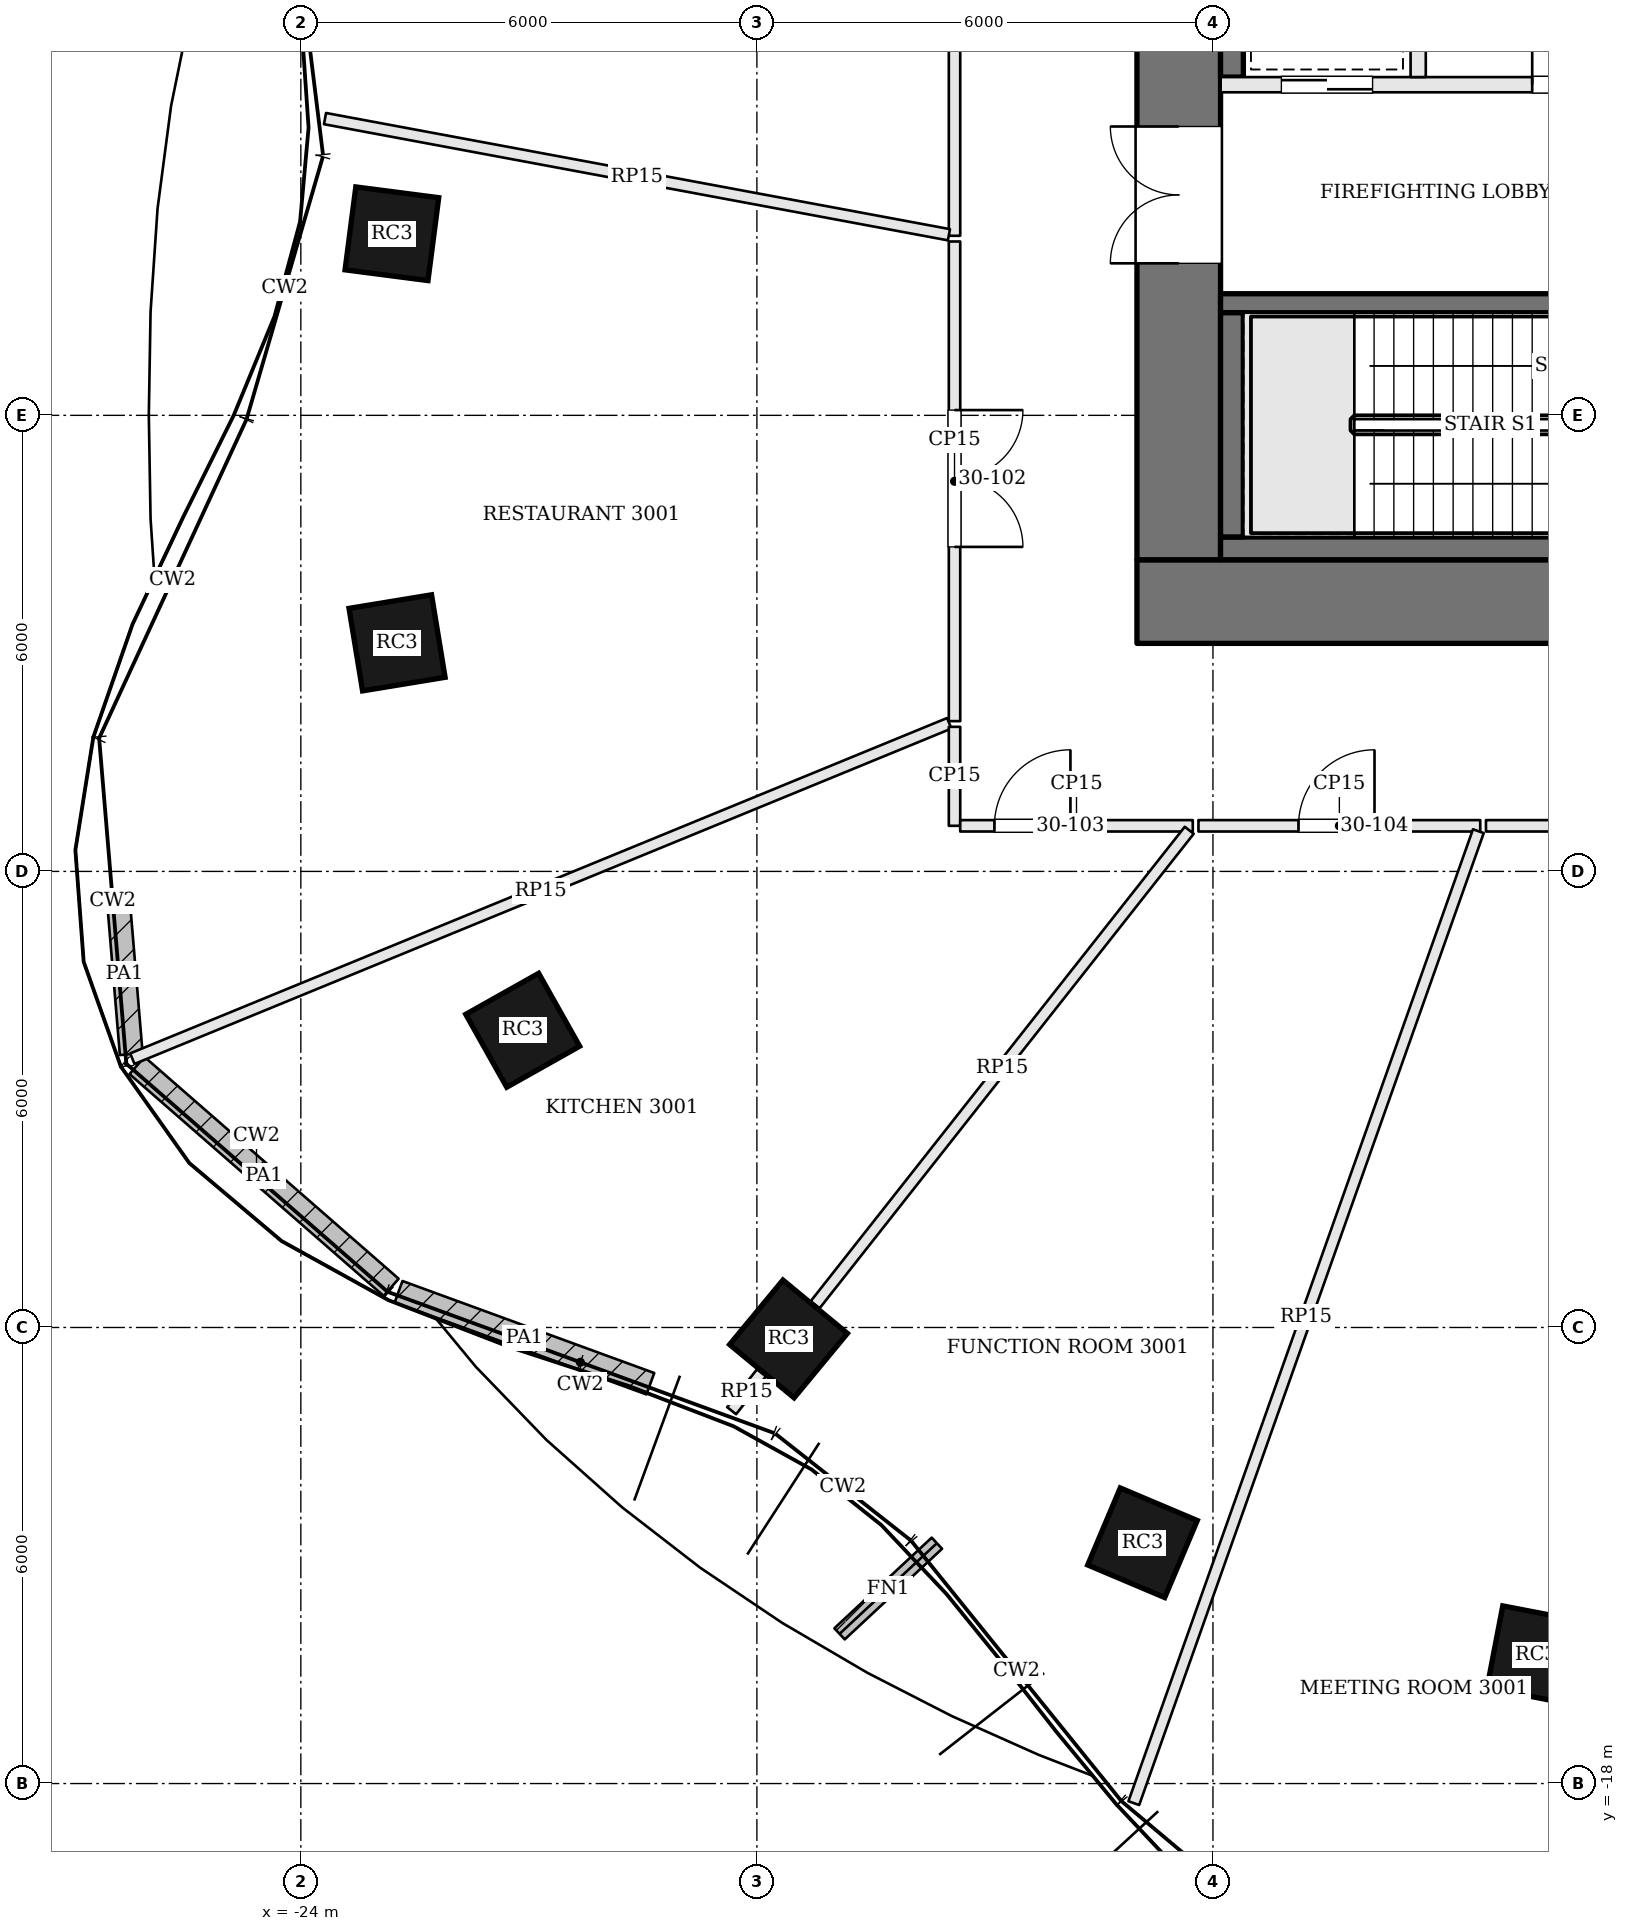
"""IFC4 building model, lengths in metres.
Left out: names, types, materials, properties, quantities, classifications, styles, units other than length and angle.
Written with IfcOpenShell. Run it as: python <this file> out.ifc"""

import sys

from ifc_helpers import new_model, si_unit, direction, frame, frame_2d, origin, origin_2d, place, context, subcontext, project, spatial, rectangle, extrude, element, fill, save


model = new_model("IFC4")
c1 = context("Model", 3, precision=1e-05, world=origin(), true_north=direction((0.0, 1.0)))
c2 = subcontext(c1, "Body", "Model", "MODEL_VIEW")
j1 = project(units=[si_unit("LENGTHUNIT", "METRE"), si_unit("PLANEANGLEUNIT", "RADIAN")], contexts=[c1])
p1 = place(None, origin())
s1 = spatial("IfcSite", under=j1, at=p1, CompositionType="ELEMENT")
p2 = place(p1, origin())
s2 = spatial("IfcBuilding", under=s1, at=p2, CompositionType="ELEMENT")
p3 = place(p2, frame((0.0, 0.0, 125.7)))
s3 = spatial("IfcBuildingStorey", under=s2, at=p3, CompositionType="ELEMENT", Elevation=125.7)
p4 = place(p3, frame((-13.0, -2.45, 0.0), z_axis=(0.0, 0.0, 1.0), x_axis=(1.0, 0.0, 0.0)))
e1 = element("IfcWall", 1, at=p4, inside=s3, PredefinedType="SHEAR", context=c2, shape_type="SweptSolid", body=[
    extrude(rectangle(XDim=26.0, YDim=1.1, at=frame_2d((13.0, 0.0))), origin(), (0.0, 0.0, 1.0), 4.8),
])
p5 = place(p4, frame((9.275, 0.0, 0.0)))
e2 = element("IfcOpeningElement", 2, at=p5, cuts=e1, PredefinedType="OPENING", context=c2, shape_type="SweptSolid", body=[
    extrude(rectangle(XDim=0.9, YDim=2.1, at=frame_2d((0.45, 1.05))), frame((0.0, 0.56, 0.0), z_axis=(0.0, -1.0, 0.0), x_axis=(1.0, 0.0, 0.0)), (0.0, 0.0, 1.0), 1.12),
])
p6 = place(p4, frame((12.525, 0.0, 0.0)))
e3 = element("IfcOpeningElement", 3, at=p6, cuts=e1, PredefinedType="OPENING", context=c2, shape_type="SweptSolid", body=[
    extrude(rectangle(XDim=0.9, YDim=2.1, at=frame_2d((0.45, 1.05))), frame((0.0, 0.56, 0.0), z_axis=(0.0, -1.0, 0.0), x_axis=(1.0, 0.0, 0.0)), (0.0, 0.0, 1.0), 1.12),
])
p7 = place(p4, frame((15.0, 0.0, 0.0)))
e4 = element("IfcOpeningElement", 4, at=p7, cuts=e1, PredefinedType="OPENING", context=c2, shape_type="SweptSolid", body=[
    extrude(rectangle(XDim=1.0, YDim=2.1, at=frame_2d((0.5, 1.05))), frame((0.0, 0.56, 0.0), z_axis=(0.0, -1.0, 0.0), x_axis=(1.0, 0.0, 0.0)), (0.0, 0.0, 1.0), 1.12),
])
p8 = place(p4, frame((16.7, 0.0, 0.0)))
e5 = element("IfcOpeningElement", 5, at=p8, cuts=e1, PredefinedType="OPENING", context=c2, shape_type="SweptSolid", body=[
    extrude(rectangle(XDim=0.9, YDim=2.1, at=frame_2d((0.45, 1.05))), frame((0.0, 0.56, 0.0), z_axis=(0.0, -1.0, 0.0), x_axis=(1.0, 0.0, 0.0)), (0.0, 0.0, 1.0), 1.12),
])
p9 = place(p3, frame((-12.45, -1.9, 0.0), z_axis=(0.0, 0.0, 1.0), x_axis=(0.0, 1.0, 0.0)))
e6 = element("IfcWall", 6, at=p9, inside=s3, PredefinedType="SHEAR", context=c2, shape_type="SweptSolid", body=[
    extrude(rectangle(XDim=12.8, YDim=1.1, at=frame_2d((6.4, 0.0))), origin(), (0.0, 0.0, 1.0), 4.8),
])
p10 = place(p9, frame((3.9, 0.0, 0.0)))
e7 = element("IfcOpeningElement", 7, at=p10, cuts=e6, PredefinedType="OPENING", context=c2, shape_type="SweptSolid", body=[
    extrude(rectangle(XDim=1.8, YDim=2.1, at=frame_2d((0.9, 1.05))), frame((0.0, 0.56, 0.0), z_axis=(0.0, -1.0, 0.0), x_axis=(1.0, 0.0, 0.0)), (0.0, 0.0, 1.0), 1.12),
])
for number, where, z_axis, x_axis in (
    (8, (-22.802, 2.389, -0.7), (0.0, 0.0, 1.0), (-0.129, -0.992, 0.0)),
    (9, (-22.734, -2.993, -0.7), (0.0, 0.0, 1.0), (0.162, -0.987, 0.0)),
    (10, (-21.081, -8.09, -0.7), (0.0, 0.0, 1.0), (0.49, -0.872, 0.0)),
    (11, (-17.584, -12.151, -0.7), (0.0, 0.0, 1.0), (0.771, -0.637, 0.0)),
    (12, (-12.927, -14.832, -0.7), (0.0, 0.0, 1.0), (0.921, -0.389, 0.0)),
    (13, (-7.751, -16.307, -0.7), (0.0, 0.0, 1.0), (0.982, -0.189, 0.0)),
):
    element("IfcColumn", number, at=place(p3, frame(where, z_axis=z_axis, x_axis=x_axis)), inside=s3, PredefinedType="COLUMN", context=c2, shape_type="SweptSolid", body=[
        extrude(rectangle(XDim=1.1, YDim=1.1, at=origin_2d()), origin(), (0.0, 0.0, 1.0), 5.5),
    ])
p11 = place(p3, frame((-15.632, -14.838, 0.0), z_axis=(0.0, 0.0, 1.0), x_axis=(-0.73177399504, -0.681547371929, 0.0)))
e14 = element("IfcWall", 14, at=p11, inside=s3, PredefinedType="SOLIDWALL", context=c2, shape_type="SweptSolid", body=[
    extrude(rectangle(XDim=1.75, YDim=0.2, at=frame_2d((0.875, 0.0))), origin(), (0.0, 0.0, 1.0), 4.6),
])
p12 = place(p3, frame((-26.407, -6.296, 4.8), z_axis=(0.0, 0.0, 1.0), x_axis=(0.083236561351, -0.99652981634, 0.0)))
e15 = element("IfcWall", 15, at=p12, inside=s3, PredefinedType="PARAPET", context=c2, shape_type="SweptSolid", body=[
    extrude(rectangle(XDim=2.115, YDim=0.3, at=frame_2d((1.057, 0.0))), origin(), (0.0, 0.0, 1.0), 1.1),
])
p13 = place(p3, frame((-26.155, -8.554, 4.8), z_axis=(0.0, 0.0, 1.0), x_axis=(0.753400870431, -0.657561501636, 0.0)))
e16 = element("IfcWall", 16, at=p13, inside=s3, PredefinedType="PARAPET", context=c2, shape_type="SweptSolid", body=[
    extrude(rectangle(XDim=4.438, YDim=0.3, at=frame_2d((2.219, 0.0))), origin(), (0.0, 0.0, 1.0), 1.1),
])
p14 = place(p3, frame((-22.714, -11.53, 4.8), z_axis=(0.0, 0.0, 1.0), x_axis=(0.93926063174, -0.343204699361, 0.0)))
e17 = element("IfcWall", 17, at=p14, inside=s3, PredefinedType="PARAPET", context=c2, shape_type="SweptSolid", body=[
    extrude(rectangle(XDim=3.526, YDim=0.3, at=frame_2d((1.763, 0.0))), origin(), (0.0, 0.0, 1.0), 1.1),
])
p15 = place(p3, frame((-11.9, 1.475, 0.0), z_axis=(0.0, 0.0, 1.0), x_axis=(1.0, 0.0, 0.0)))
e18 = element("IfcWall", 18, at=p15, inside=s3, PredefinedType="SOLIDWALL", context=c2, shape_type="SweptSolid", body=[
    extrude(rectangle(XDim=6.8, YDim=0.25, at=frame_2d((3.4, 0.0))), origin(), (0.0, 0.0, 1.0), 4.6),
])
p16 = place(p15, frame((5.5, 0.0, 0.0)))
e19 = element("IfcOpeningElement", 19, at=p16, cuts=e18, PredefinedType="OPENING", context=c2, shape_type="SweptSolid", body=[
    extrude(rectangle(XDim=1.2, YDim=2.1, at=frame_2d((0.6, 1.05))), frame((0.0, 0.135, 0.0), z_axis=(0.0, -1.0, 0.0), x_axis=(1.0, 0.0, 0.0)), (0.0, 0.0, 1.0), 0.27),
])
p17 = place(p3, frame((-11.9, 4.35, 0.0), z_axis=(0.0, 0.0, 1.0), x_axis=(1.0, 0.0, 0.0)))
e20 = element("IfcWall", 20, at=p17, inside=s3, PredefinedType="SOLIDWALL", context=c2, shape_type="SweptSolid", body=[
    extrude(rectangle(XDim=6.8, YDim=0.2, at=frame_2d((3.4, 0.0))), origin(), (0.0, 0.0, 1.0), 4.6),
])
p18 = place(p17, frame((4.1, 0.0, 0.0)))
e21 = element("IfcOpeningElement", 21, at=p18, cuts=e20, PredefinedType="OPENING", context=c2, shape_type="SweptSolid", body=[
    extrude(rectangle(XDim=1.2, YDim=2.1, at=frame_2d((0.6, 1.05))), frame((0.0, 0.11, 0.0), z_axis=(0.0, -1.0, 0.0), x_axis=(1.0, 0.0, 0.0)), (0.0, 0.0, 1.0), 0.22),
])
p19 = place(p17, frame((0.8, 0.0, 0.0)))
e22 = element("IfcOpeningElement", 22, at=p19, cuts=e20, PredefinedType="OPENING", context=c2, shape_type="SweptSolid", body=[
    extrude(rectangle(XDim=1.2, YDim=2.1, at=frame_2d((0.6, 1.05))), frame((0.0, 0.11, 0.0), z_axis=(0.0, -1.0, 0.0), x_axis=(1.0, 0.0, 0.0)), (0.0, 0.0, 1.0), 0.22),
])
p20 = place(p3, frame((-9.3, 4.45, 0.0), z_axis=(0.0, 0.0, 1.0), x_axis=(0.0, 1.0, 0.0)))
e23 = element("IfcWall", 23, at=p20, inside=s3, PredefinedType="SOLIDWALL", context=c2, shape_type="SweptSolid", body=[
    extrude(rectangle(XDim=3.0, YDim=0.2, at=frame_2d((1.5, 0.0))), origin(), (0.0, 0.0, 1.0), 4.6),
])
p21 = place(p3, frame((-11.9, -1.75, 0.0), z_axis=(0.0, 0.0, 1.0), x_axis=(1.0, 0.0, 0.0)))
e24 = element("IfcWall", 24, at=p21, inside=s3, PredefinedType="SOLIDWALL", context=c2, shape_type="SweptSolid", body=[
    extrude(rectangle(XDim=6.8, YDim=0.3, at=frame_2d((3.4, 0.0))), origin(), (0.0, 0.0, 1.0), 4.6),
])
p22 = place(p3, frame((-11.75, -1.6, 0.0), z_axis=(0.0, 0.0, 1.0), x_axis=(0.0, 1.0, 0.0)))
e25 = element("IfcWall", 25, at=p22, inside=s3, PredefinedType="SOLIDWALL", context=c2, shape_type="SweptSolid", body=[
    extrude(rectangle(XDim=2.95, YDim=0.3, at=frame_2d((1.475, 0.0))), origin(), (0.0, 0.0, 1.0), 4.6),
])
p23 = place(p3, frame((-11.75, 4.45, 0.0), z_axis=(0.0, 0.0, 1.0), x_axis=(0.0, 1.0, 0.0)))
e26 = element("IfcWall", 26, at=p23, inside=s3, PredefinedType="SOLIDWALL", context=c2, shape_type="SweptSolid", body=[
    extrude(rectangle(XDim=3.0, YDim=0.3, at=frame_2d((1.5, 0.0))), origin(), (0.0, 0.0, 1.0), 4.6),
])
p24 = place(p3, frame((-15.4, 14.325, 0.0), z_axis=(0.0, 0.0, 1.0), x_axis=(0.0, -1.0, 0.0)))
e27 = element("IfcWall", 27, at=p24, inside=s3, PredefinedType="PARTITIONING", context=c2, shape_type="SweptSolid", body=[
    extrude(rectangle(XDim=11.963, YDim=0.15, at=frame_2d((5.981, 0.0))), origin(), (0.0, 0.0, 1.0), 4.098),
])
p25 = place(p24, frame((2.913, 0.0, 0.0)))
e28 = element("IfcOpeningElement", 28, at=p25, cuts=e27, PredefinedType="OPENING", context=c2, shape_type="SweptSolid", body=[
    extrude(rectangle(XDim=1.8, YDim=2.1, at=frame_2d((0.9, 1.05))), frame((0.0, 0.085, 0.0), z_axis=(0.0, -1.0, 0.0), x_axis=(1.0, 0.0, 0.0)), (0.0, 0.0, 1.0), 0.17),
])
p26 = place(p3, frame((-23.682, 3.904, 0.0), z_axis=(0.0, 0.0, 1.0), x_axis=(0.983104115743, -0.183047255125, 0.0)))
e29 = element("IfcWall", 29, at=p26, inside=s3, PredefinedType="PARTITIONING", context=c2, shape_type="SweptSolid", body=[
    extrude(rectangle(XDim=8.349, YDim=0.15, at=frame_2d((4.175, 0.0))), origin(), (0.0, 0.0, 1.0), 4.098),
])
p27 = place(p3, frame((-15.4, 2.287, 0.0), z_axis=(0.0, 0.0, 1.0), x_axis=(0.0, -1.0, 0.0)))
e30 = element("IfcWall", 30, at=p27, inside=s3, PredefinedType="PARTITIONING", context=c2, shape_type="SweptSolid", body=[
    extrude(rectangle(XDim=6.31, YDim=0.15, at=frame_2d((3.155, 0.0))), origin(), (0.0, 0.0, 1.0), 4.098),
])
p28 = place(p27, frame((2.218, 0.0, 0.0)))
e31 = element("IfcOpeningElement", 31, at=p28, cuts=e30, PredefinedType="OPENING", context=c2, shape_type="SweptSolid", body=[
    extrude(rectangle(XDim=1.8, YDim=2.1, at=frame_2d((0.9, 1.05))), frame((0.0, 0.085, 0.0), z_axis=(0.0, -1.0, 0.0), x_axis=(1.0, 0.0, 0.0)), (0.0, 0.0, 1.0), 0.17),
])
p29 = place(p3, frame((-26.217, -8.463, 0.0), z_axis=(0.0, 0.0, 1.0), x_axis=(0.925083636107, 0.379763434532, 0.0)))
e32 = element("IfcWall", 32, at=p29, inside=s3, PredefinedType="PARTITIONING", context=c2, shape_type="SweptSolid", body=[
    extrude(rectangle(XDim=11.617, YDim=0.15, at=frame_2d((5.809, 0.0))), origin(), (0.0, 0.0, 1.0), 4.098),
])
p30 = place(p3, frame((-15.4, -4.098, 0.0), z_axis=(0.0, 0.0, 1.0), x_axis=(0.0, -1.0, 0.0)))
e33 = element("IfcWall", 33, at=p30, inside=s3, PredefinedType="PARTITIONING", context=c2, shape_type="SweptSolid", body=[
    extrude(rectangle(XDim=1.302, YDim=0.15, at=frame_2d((0.651, 0.0))), origin(), (0.0, 0.0, 1.0), 4.098),
])
p31 = place(p3, frame((-15.325, -5.4, 0.0), z_axis=(0.0, 0.0, 1.0), x_axis=(1.0, 0.0, 0.0)))
e34 = element("IfcWall", 34, at=p31, inside=s3, PredefinedType="PARTITIONING", context=c2, shape_type="SweptSolid", body=[
    extrude(rectangle(XDim=3.059, YDim=0.15, at=frame_2d((1.53, 0.0))), origin(), (0.0, 0.0, 1.0), 4.098),
])
p32 = place(p31, frame((0.45, 0.0, 0.0)))
e35 = element("IfcOpeningElement", 35, at=p32, cuts=e34, PredefinedType="OPENING", context=c2, shape_type="SweptSolid", body=[
    extrude(rectangle(XDim=1.0, YDim=2.1, at=frame_2d((0.5, 1.05))), frame((0.0, 0.085, 0.0), z_axis=(0.0, -1.0, 0.0), x_axis=(1.0, 0.0, 0.0)), (0.0, 0.0, 1.0), 0.17),
])
p33 = place(p3, frame((-18.333, -13.094, 0.0), z_axis=(0.0, 0.0, 1.0), x_axis=(0.619282324344, 0.785168391337, 0.0)))
e36 = element("IfcWall", 36, at=p33, inside=s3, PredefinedType="PARTITIONING", context=c2, shape_type="SweptSolid", body=[
    extrude(rectangle(XDim=0.634, YDim=0.15, at=frame_2d((0.317, 0.0))), origin(), (0.0, 0.0, 1.0), 4.098),
])
p34 = place(p3, frame((-17.234, -11.701, 0.0), z_axis=(0.0, 0.0, 1.0), x_axis=(0.619162183123, 0.785263134873, 0.0)))
e37 = element("IfcWall", 37, at=p34, inside=s3, PredefinedType="PARTITIONING", context=c2, shape_type="SweptSolid", body=[
    extrude(rectangle(XDim=7.949, YDim=0.15, at=frame_2d((3.975, 0.0))), origin(), (0.0, 0.0, 1.0), 4.098),
])
p35 = place(p3, frame((-12.191, -5.4, 0.0), z_axis=(0.0, 0.0, 1.0), x_axis=(1.0, 0.0, 0.0)))
e38 = element("IfcWall", 38, at=p35, inside=s3, PredefinedType="PARTITIONING", context=c2, shape_type="SweptSolid", body=[
    extrude(rectangle(XDim=3.707, YDim=0.15, at=frame_2d((1.854, 0.0))), origin(), (0.0, 0.0, 1.0), 4.098),
])
p36 = place(p35, frame((1.316, 0.0, 0.0)))
e39 = element("IfcOpeningElement", 39, at=p36, cuts=e38, PredefinedType="OPENING", context=c2, shape_type="SweptSolid", body=[
    extrude(rectangle(XDim=1.0, YDim=2.4, at=frame_2d((0.5, 1.2))), frame((0.0, 0.085, 0.0), z_axis=(0.0, -1.0, 0.0), x_axis=(1.0, 0.0, 0.0)), (0.0, 0.0, 1.0), 0.17),
])
p37 = place(p3, frame((-13.041, -18.258, 0.0), z_axis=(0.0, 0.0, 1.0), x_axis=(0.334127286722, 0.94252796047, 0.0)))
e40 = element("IfcWall", 40, at=p37, inside=s3, PredefinedType="PARTITIONING", context=c2, shape_type="SweptSolid", body=[
    extrude(rectangle(XDim=13.567, YDim=0.15, at=frame_2d((6.783, 0.0))), origin(), (0.0, 0.0, 1.0), 4.098),
])
p38 = place(p3, frame((-8.408, -5.4, 0.0), z_axis=(0.0, 0.0, 1.0), x_axis=(1.0, 0.0, 0.0)))
e41 = element("IfcWall", 41, at=p38, inside=s3, PredefinedType="PARTITIONING", context=c2, shape_type="SweptSolid", body=[
    extrude(rectangle(XDim=3.608, YDim=0.15, at=frame_2d((1.804, 0.0))), origin(), (0.0, 0.0, 1.0), 4.098),
])
p39 = place(p38, frame((1.267, 0.0, 0.0)))
e42 = element("IfcOpeningElement", 42, at=p39, cuts=e41, PredefinedType="OPENING", context=c2, shape_type="SweptSolid", body=[
    extrude(rectangle(XDim=1.0, YDim=2.4, at=frame_2d((0.5, 1.2))), frame((0.0, 0.085, 0.0), z_axis=(0.0, -1.0, 0.0), x_axis=(1.0, 0.0, 0.0)), (0.0, 0.0, 1.0), 0.17),
])
p40 = place(p10, origin())
e43 = element("IfcDoor", 43, at=p40, inside=s3, OperationType="DOUBLE_DOOR_SINGLE_SWING", PredefinedType="DOOR", context=c2, shape_type="SweptSolid", body=[
    extrude(rectangle(XDim=1.8, YDim=2.1, at=frame_2d((0.9, 1.05))), frame((0.0, 0.025, 0.0), z_axis=(0.0, -1.0, 0.0), x_axis=(1.0, 0.0, 0.0)), (0.0, 0.0, 1.0), 0.05),
])
fill(e7, e43)
p41 = place(p18, origin())
e44 = element("IfcDoor", 44, at=p41, inside=s3, OperationType="SINGLE_SWING_LEFT", PredefinedType="DOOR", context=c2, shape_type="SweptSolid", body=[
    extrude(rectangle(XDim=1.2, YDim=2.1, at=frame_2d((0.6, 1.05))), frame((0.0, 0.025, 0.0), z_axis=(0.0, -1.0, 0.0), x_axis=(1.0, 0.0, 0.0)), (0.0, 0.0, 1.0), 0.05),
])
fill(e21, e44)
p42 = place(p19, origin())
e45 = element("IfcDoor", 45, at=p42, inside=s3, OperationType="SLIDING_TO_RIGHT", PredefinedType="DOOR", context=c2, shape_type="SweptSolid", body=[
    extrude(rectangle(XDim=1.2, YDim=2.1, at=frame_2d((0.6, 1.05))), frame((0.0, 0.025, 0.0), z_axis=(0.0, -1.0, 0.0), x_axis=(1.0, 0.0, 0.0)), (0.0, 0.0, 1.0), 0.05),
])
fill(e22, e45)
p43 = place(p28, origin())
e46 = element("IfcDoor", 46, at=p43, inside=s3, OperationType="DOUBLE_DOOR_SINGLE_SWING", PredefinedType="DOOR", context=c2, shape_type="SweptSolid", body=[
    extrude(rectangle(XDim=1.8, YDim=2.1, at=frame_2d((0.9, 1.05))), frame((0.0, 0.025, 0.0), z_axis=(0.0, -1.0, 0.0), x_axis=(1.0, 0.0, 0.0)), (0.0, 0.0, 1.0), 0.05),
])
fill(e31, e46)
p44 = place(p32, origin())
e47 = element("IfcDoor", 47, at=p44, inside=s3, OperationType="SINGLE_SWING_RIGHT", PredefinedType="DOOR", context=c2, shape_type="SweptSolid", body=[
    extrude(rectangle(XDim=1.0, YDim=2.1, at=frame_2d((0.5, 1.05))), frame((0.0, 0.025, 0.0), z_axis=(0.0, -1.0, 0.0), x_axis=(1.0, 0.0, 0.0)), (0.0, 0.0, 1.0), 0.05),
])
fill(e35, e47)
p45 = place(p36, origin())
e48 = element("IfcDoor", 48, at=p45, inside=s3, OperationType="SINGLE_SWING_RIGHT", PredefinedType="DOOR", context=c2, shape_type="SweptSolid", body=[
    extrude(rectangle(XDim=1.0, YDim=2.4, at=frame_2d((0.5, 1.2))), frame((0.0, 0.025, 0.0), z_axis=(0.0, -1.0, 0.0), x_axis=(1.0, 0.0, 0.0)), (0.0, 0.0, 1.0), 0.05),
])
fill(e39, e48)
save(model, sys.argv[1])
